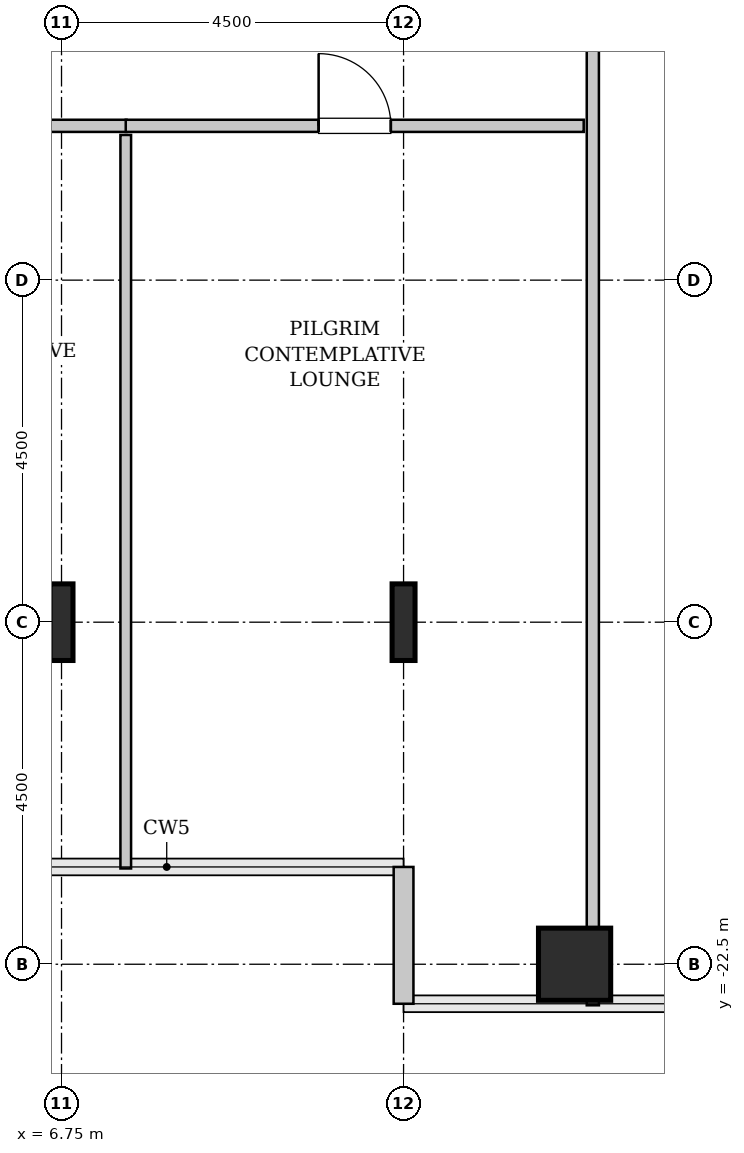
"""IFC4 building model, lengths in metres.
Left out: names, types, materials, properties, quantities, classifications, styles, units other than length and angle.
Written with IfcOpenShell. Run it as: python <this file> out.ifc"""

import sys

from ifc_helpers import new_model, si_unit, direction, frame, frame_2d, origin, origin_2d, place, context, subcontext, project, spatial, rectangle, hollow_rectangle, i_section, extrude, source, transform, mapped, element, fill, save


model = new_model("IFC4")
c1 = context("Model", 3, precision=1e-05, world=origin(), true_north=direction((0.0, 1.0)))
c2 = subcontext(c1, "Body", "Model", "MODEL_VIEW")
j1 = project(units=[si_unit("LENGTHUNIT", "METRE"), si_unit("PLANEANGLEUNIT", "RADIAN")], contexts=[c1])
p1 = place(None, origin())
s1 = spatial("IfcSite", under=j1, at=p1, CompositionType="ELEMENT")
p2 = place(p1, origin())
s2 = spatial("IfcBuilding", under=s1, at=p2, CompositionType="ELEMENT")
p3 = place(p2, frame((0.0, 0.0, 48.2)))
s3 = spatial("IfcBuildingStorey", under=s2, at=p3, CompositionType="ELEMENT", Elevation=48.2)
m1 = source(origin(), c2, "Body", "SweptSolid", [
    extrude(i_section(OverallWidth=0.302, OverallDepth=1.008, WebThickness=0.021, FlangeThickness=0.04, FilletRadius=0.03, at=origin_2d()), origin(), (0.0, 0.0, 1.0), 3.8),
])
for number, where, z_axis, x_axis in (
    (1, (6.75, -18.0, 0.0), (0.0, 0.0, 1.0), (1.0, 0.0, 0.0)),
    (2, (11.25, -18.0, 0.0), (0.0, 0.0, 1.0), (1.0, 0.0, 0.0)),
):
    element("IfcColumn", number, at=place(p3, frame(where, z_axis=z_axis, x_axis=x_axis)), inside=s3, PredefinedType="COLUMN", context=c2, shape_type="MappedRepresentation", body=[
        mapped(m1, transform((0.0, 0.0, 0.0), x_axis=(1.0, 0.0, 0.0), y_axis=(0.0, 1.0, 0.0), z_axis=(0.0, 0.0, 1.0), scale=1.0)),
    ])
m2 = source(origin(), c2, "Body", "SweptSolid", [
    extrude(hollow_rectangle(XDim=0.95, YDim=0.95, WallThickness=0.045, InnerFilletRadius=0.045, OuterFilletRadius=0.09, at=origin_2d()), origin(), (0.0, 0.0, 1.0), 3.8),
])
p4 = place(p3, frame((13.5, -22.5, 0.0), z_axis=(0.0, 0.0, 1.0), x_axis=(1.0, 0.0, 0.0)))
e3 = element("IfcColumn", 3, at=p4, inside=s3, PredefinedType="COLUMN", context=c2, shape_type="MappedRepresentation", body=[
    mapped(m2, transform((0.0, 0.0, 0.0), x_axis=(1.0, 0.0, 0.0), y_axis=(0.0, 1.0, 0.0), z_axis=(0.0, 0.0, 1.0), scale=1.0)),
])
m3 = source(origin(), c2, "Body", "SweptSolid", [
    extrude(rectangle(XDim=1.8, YDim=0.26, at=frame_2d((0.9, 0.0))), origin(), (0.0, 0.0, 1.0), 3.55),
])
p5 = place(p3, frame((11.25, -21.22, 0.0), z_axis=(0.0, 0.0, 1.0), x_axis=(0.0, -1.0, 0.0)))
e4 = element("IfcWall", 4, at=p5, inside=s3, PredefinedType="SOLIDWALL", context=c2, shape_type="MappedRepresentation", body=[
    mapped(m3, transform((0.0, 0.0, 0.0), x_axis=(1.0, 0.0, 0.0), y_axis=(0.0, 1.0, 0.0), z_axis=(0.0, 0.0, 1.0), scale=1.0)),
])
m4 = source(origin(), c2, "Body", "SweptSolid", [
    extrude(rectangle(XDim=15.845, YDim=0.16, at=frame_2d((7.922, 0.0))), origin(), (0.0, 0.0, 1.0), 3.535),
])
p6 = place(p3, frame((13.74, -23.04, 0.0), z_axis=(0.0, 0.0, 1.0), x_axis=(0.0, 1.0, 0.0)))
e5 = element("IfcWall", 5, at=p6, inside=s3, PredefinedType="PARTITIONING", context=c2, shape_type="MappedRepresentation", body=[
    mapped(m4, transform((0.0, 0.0, 0.0), x_axis=(1.0, 0.0, 0.0), y_axis=(0.0, 1.0, 0.0), z_axis=(0.0, 0.0, 1.0), scale=1.0)),
])
p7 = place(p6, frame((13.212, 0.0, 0.0)))
e6 = element("IfcOpeningElement", 6, at=p7, cuts=e5, PredefinedType="OPENING", context=c2, shape_type="SweptSolid", body=[
    extrude(rectangle(XDim=0.95, YDim=2.1, at=frame_2d((0.475, 1.05))), frame((0.0, 0.09, 0.0), z_axis=(0.0, -1.0, 0.0), x_axis=(1.0, 0.0, 0.0)), (0.0, 0.0, 1.0), 0.18),
])
m5 = source(origin(), c2, "Body", "SweptSolid", [
    extrude(rectangle(XDim=3.705, YDim=0.16, at=frame_2d((1.853, 0.0))), origin(), (0.0, 0.0, 1.0), 3.535),
])
p8 = place(p3, frame((3.9, -11.47, 0.0), z_axis=(0.0, 0.0, 1.0), x_axis=(1.0, 0.0, 0.0)))
e7 = element("IfcWall", 7, at=p8, inside=s3, PredefinedType="PARTITIONING", context=c2, shape_type="MappedRepresentation", body=[
    mapped(m5, transform((0.0, 0.0, 0.0), x_axis=(1.0, 0.0, 0.0), y_axis=(0.0, 1.0, 0.0), z_axis=(0.0, 0.0, 1.0), scale=1.0)),
])
p9 = place(p8, frame((1.377, 0.0, 0.0)))
e8 = element("IfcOpeningElement", 8, at=p9, cuts=e7, PredefinedType="OPENING", context=c2, shape_type="SweptSolid", body=[
    extrude(rectangle(XDim=0.95, YDim=2.1, at=frame_2d((0.475, 1.05))), frame((0.0, 0.09, 0.0), z_axis=(0.0, -1.0, 0.0), x_axis=(1.0, 0.0, 0.0)), (0.0, 0.0, 1.0), 0.18),
])
m6 = source(origin(), c2, "Body", "SweptSolid", [
    extrude(rectangle(XDim=9.65, YDim=0.14, at=frame_2d((4.825, 0.0))), origin(), (0.0, 0.0, 1.0), 3.535),
])
p10 = place(p3, frame((7.595, -21.24, 0.0), z_axis=(0.0, 0.0, 1.0), x_axis=(0.0, 1.0, 0.0)))
e9 = element("IfcWall", 9, at=p10, inside=s3, PredefinedType="PARTITIONING", context=c2, shape_type="MappedRepresentation", body=[
    mapped(m6, transform((0.0, 0.0, 0.0), x_axis=(1.0, 0.0, 0.0), y_axis=(0.0, 1.0, 0.0), z_axis=(0.0, 0.0, 1.0), scale=1.0)),
])
m7 = source(origin(), c2, "Body", "SweptSolid", [
    extrude(rectangle(XDim=6.025, YDim=0.16, at=frame_2d((3.013, 0.0))), origin(), (0.0, 0.0, 1.0), 3.535),
])
p11 = place(p3, frame((7.595, -11.47, 0.0), z_axis=(0.0, 0.0, 1.0), x_axis=(1.0, 0.0, 0.0)))
e10 = element("IfcWall", 10, at=p11, inside=s3, PredefinedType="PARTITIONING", context=c2, shape_type="MappedRepresentation", body=[
    mapped(m7, transform((0.0, 0.0, 0.0), x_axis=(1.0, 0.0, 0.0), y_axis=(0.0, 1.0, 0.0), z_axis=(0.0, 0.0, 1.0), scale=1.0)),
])
p12 = place(p11, frame((2.538, 0.0, 0.0)))
e11 = element("IfcOpeningElement", 11, at=p12, cuts=e10, PredefinedType="OPENING", context=c2, shape_type="SweptSolid", body=[
    extrude(rectangle(XDim=0.95, YDim=2.1, at=frame_2d((0.475, 1.05))), frame((0.0, 0.09, 0.0), z_axis=(0.0, -1.0, 0.0), x_axis=(1.0, 0.0, 0.0)), (0.0, 0.0, 1.0), 0.18),
])
m8 = source(origin(), c2, "Body", "SweptSolid", [
    extrude(rectangle(XDim=0.95, YDim=2.1, at=frame_2d((0.475, 1.05))), frame((0.0, 0.025, 0.0), z_axis=(0.0, -1.0, 0.0), x_axis=(1.0, 0.0, 0.0)), (0.0, 0.0, 1.0), 0.05),
])
p13 = place(p12, origin())
e12 = element("IfcDoor", 12, at=p13, inside=s3, OperationType="SINGLE_SWING_LEFT", PredefinedType="DOOR", context=c2, shape_type="MappedRepresentation", body=[
    mapped(m8, transform((0.0, 0.0, 0.0), x_axis=(1.0, 0.0, 0.0), y_axis=(0.0, 1.0, 0.0), z_axis=(0.0, 0.0, 1.0), scale=1.0)),
])
fill(e11, e12)
save(model, sys.argv[1])
